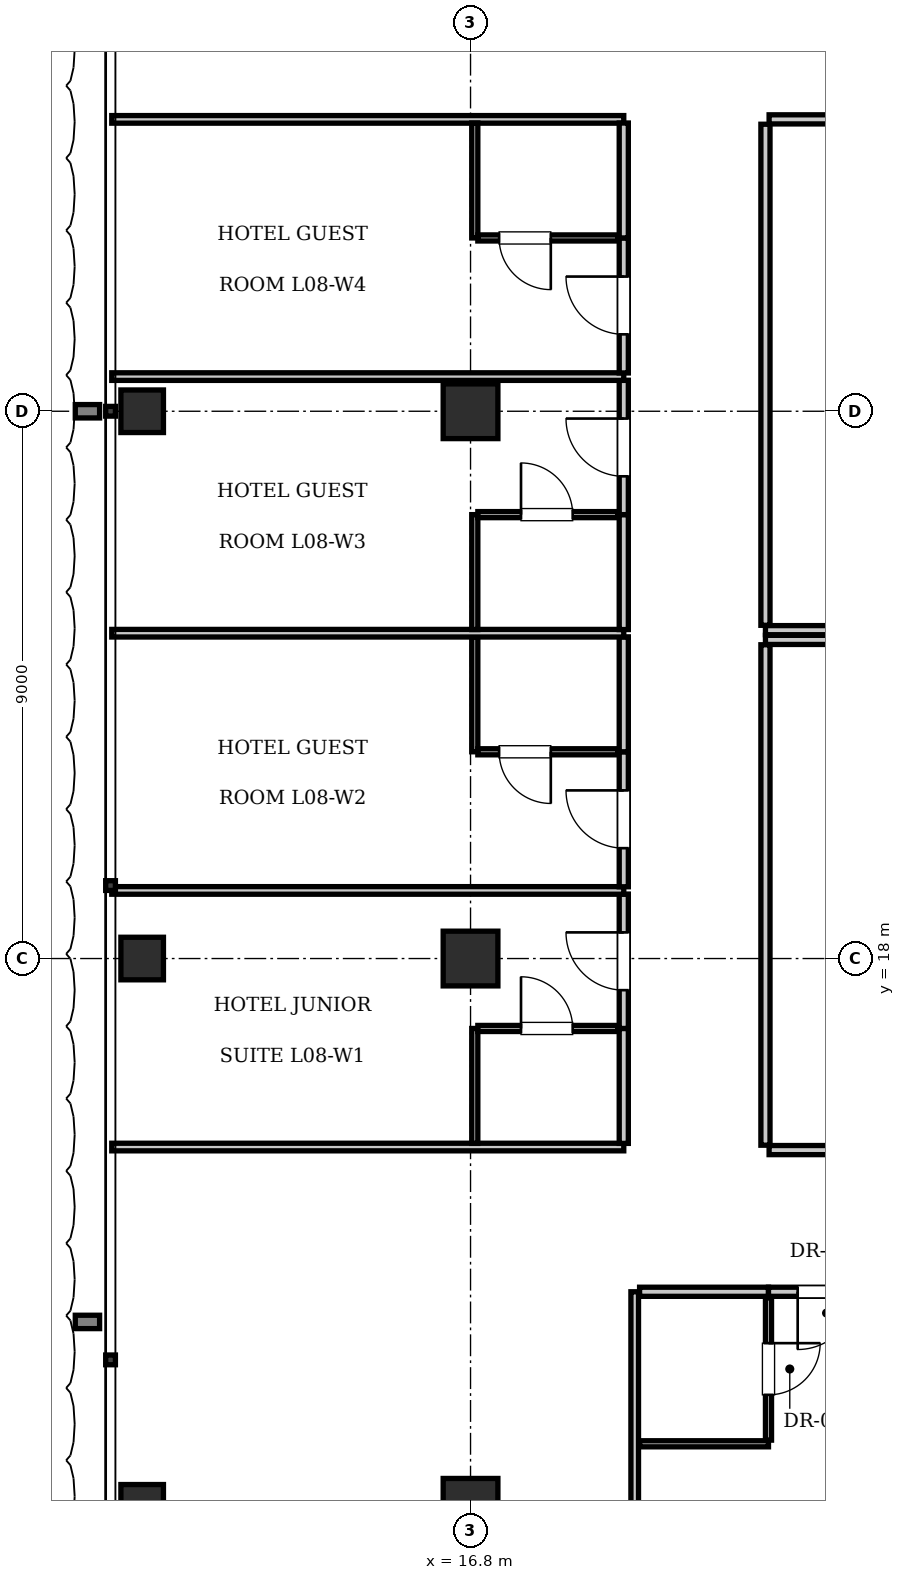
"""IFC4 building model, lengths in metres.
Left out: names, types, materials, properties, quantities, classifications, styles, units other than length and angle.
Written with IfcOpenShell. Run it as: python <this file> out.ifc"""

import sys

from ifc_helpers import new_model, si_unit, direction, frame, frame_2d, origin, origin_2d, place, context, subcontext, project, spatial, rectangle, i_section, extrude, element, fill, save


model = new_model("IFC4")
c1 = context("Model", 3, precision=1e-05, world=origin(), true_north=direction((0.0, 1.0)))
c2 = subcontext(c1, "Body", "Model", "MODEL_VIEW")
j1 = project(units=[si_unit("LENGTHUNIT", "METRE"), si_unit("PLANEANGLEUNIT", "RADIAN")], contexts=[c1])
p1 = place(None, origin())
s1 = spatial("IfcSite", under=j1, at=p1, CompositionType="ELEMENT")
p2 = place(p1, origin())
s2 = spatial("IfcBuilding", under=s1, at=p2, CompositionType="ELEMENT")
p3 = place(p2, frame((0.0, 0.0, 38.5)))
s3 = spatial("IfcBuildingStorey", under=s2, at=p3, CompositionType="ELEMENT", Elevation=38.5)
for number, where, z_axis, x_axis in (
    (1, (16.8, 9.0, 0.0), (0.0, 0.0, 1.0), (1.0, 0.0, 0.0)),
    (2, (16.8, 18.0, 0.0), (0.0, 0.0, 1.0), (1.0, 0.0, 0.0)),
    (3, (16.8, 27.0, 0.0), (0.0, 0.0, 1.0), (1.0, 0.0, 0.0)),
):
    element("IfcColumn", number, at=place(p3, frame(where, z_axis=z_axis, x_axis=x_axis)), inside=s3, PredefinedType="COLUMN", context=c2, shape_type="SweptSolid", body=[
        extrude(rectangle(XDim=0.9, YDim=0.9, at=origin_2d()), origin(), (0.0, 0.0, 1.0), 3.85),
    ])
for number, where, z_axis, x_axis in (
    (4, (11.4, 9.0, 0.0), (0.0, 0.0, 1.0), (1.0, 0.0, 0.0)),
    (5, (11.4, 18.0, 0.0), (0.0, 0.0, 1.0), (1.0, 0.0, 0.0)),
    (6, (11.4, 27.0, 0.0), (0.0, 0.0, 1.0), (1.0, 0.0, 0.0)),
):
    element("IfcColumn", number, at=place(p3, frame(where, z_axis=z_axis, x_axis=x_axis)), inside=s3, PredefinedType="COLUMN", context=c2, shape_type="SweptSolid", body=[
        extrude(i_section(OverallWidth=0.7, OverallDepth=0.7, WebThickness=0.028, FlangeThickness=0.044, at=origin_2d()), origin(), (0.0, 0.0, 1.0), 3.85),
    ])
p4 = place(p3, frame((21.65, 23.4, 0.0), z_axis=(0.0, 0.0, 1.0), x_axis=(1.0, 0.0, 0.0)))
e7 = element("IfcWall", 7, at=p4, inside=s3, PredefinedType="PARTITIONING", context=c2, shape_type="SweptSolid", body=[
    extrude(rectangle(XDim=32.3, YDim=0.15, at=frame_2d((16.15, 0.0))), origin(), (0.0, 0.0, 1.0), 3.61),
])
p5 = place(p3, frame((21.65, 23.48, 0.0), z_axis=(0.0, 0.0, 1.0), x_axis=(0.0, 1.0, 0.0)))
e8 = element("IfcWall", 8, at=p5, inside=s3, PredefinedType="PARTITIONING", context=c2, shape_type="SweptSolid", body=[
    extrude(rectangle(XDim=8.24, YDim=0.15, at=frame_2d((4.12, 0.0))), origin(), (0.0, 0.0, 1.0), 3.61),
])
p6 = place(p3, frame((21.71, 31.8, 0.0), z_axis=(0.0, 0.0, 1.0), x_axis=(1.0, 0.0, 0.0)))
e9 = element("IfcWall", 9, at=p6, inside=s3, PredefinedType="PARTITIONING", context=c2, shape_type="SweptSolid", body=[
    extrude(rectangle(XDim=5.078, YDim=0.15, at=frame_2d((2.539, 0.0))), origin(), (0.0, 0.0, 1.0), 3.61),
])
p7 = place(p6, frame((2.089, 0.0, 0.0)))
e10 = element("IfcOpeningElement", 10, at=p7, cuts=e9, PredefinedType="OPENING", context=c2, shape_type="SweptSolid", body=[
    extrude(rectangle(XDim=0.9, YDim=2.1, at=frame_2d((0.45, 1.05))), frame((0.0, 0.085, 0.0), z_axis=(0.0, -1.0, 0.0), x_axis=(1.0, 0.0, 0.0)), (0.0, 0.0, 1.0), 0.17),
])
p8 = place(p3, frame((21.65, 23.24, 0.0), z_axis=(0.0, 0.0, 1.0), x_axis=(1.0, 0.0, 0.0)))
e11 = element("IfcWall", 11, at=p8, inside=s3, PredefinedType="PARTITIONING", context=c2, shape_type="SweptSolid", body=[
    extrude(rectangle(XDim=32.3, YDim=0.15, at=frame_2d((16.15, 0.0))), origin(), (0.0, 0.0, 1.0), 3.61),
])
p9 = place(p3, frame((21.65, 14.93, 0.0), z_axis=(0.0, 0.0, 1.0), x_axis=(0.0, 1.0, 0.0)))
e12 = element("IfcWall", 12, at=p9, inside=s3, PredefinedType="PARTITIONING", context=c2, shape_type="SweptSolid", body=[
    extrude(rectangle(XDim=8.23, YDim=0.15, at=frame_2d((4.115, 0.0))), origin(), (0.0, 0.0, 1.0), 3.61),
])
p10 = place(p3, frame((21.71, 14.85, 0.0), z_axis=(0.0, 0.0, 1.0), x_axis=(1.0, 0.0, 0.0)))
e13 = element("IfcWall", 13, at=p10, inside=s3, PredefinedType="PARTITIONING", context=c2, shape_type="SweptSolid", body=[
    extrude(rectangle(XDim=11.861, YDim=0.15, at=frame_2d((5.931, 0.0))), origin(), (0.0, 0.0, 1.0), 3.61),
])
p11 = place(p10, frame((5.48, 0.0, 0.0)))
e14 = element("IfcOpeningElement", 14, at=p11, cuts=e13, PredefinedType="OPENING", context=c2, shape_type="SweptSolid", body=[
    extrude(rectangle(XDim=0.9, YDim=2.1, at=frame_2d((0.45, 1.05))), frame((0.0, 0.085, 0.0), z_axis=(0.0, -1.0, 0.0), x_axis=(1.0, 0.0, 0.0)), (0.0, 0.0, 1.0), 0.17),
])
p12 = place(p3, frame((19.5, 0.1, 0.0), z_axis=(0.0, 0.0, 1.0), x_axis=(0.0, 1.0, 0.0)))
e15 = element("IfcWall", 15, at=p12, inside=s3, PredefinedType="PARTITIONING", context=c2, shape_type="SweptSolid", body=[
    extrude(rectangle(XDim=12.42, YDim=0.125, at=frame_2d((6.21, 0.0))), origin(), (0.0, 0.0, 1.0), 3.61),
])
p13 = place(p3, frame((19.58, 12.52, 0.0), z_axis=(0.0, 0.0, 1.0), x_axis=(1.0, 0.0, 0.0)))
e16 = element("IfcWall", 16, at=p13, inside=s3, PredefinedType="PARTITIONING", context=c2, shape_type="SweptSolid", body=[
    extrude(rectangle(XDim=2.12, YDim=0.15, at=frame_2d((1.06, 0.0))), origin(), (0.0, 0.0, 1.0), 3.61),
])
p14 = place(p3, frame((19.58, 10.02, 0.0), z_axis=(0.0, 0.0, 1.0), x_axis=(1.0, 0.0, 0.0)))
e17 = element("IfcWall", 17, at=p14, inside=s3, PredefinedType="PARTITIONING", context=c2, shape_type="SweptSolid", body=[
    extrude(rectangle(XDim=2.12, YDim=0.1, at=frame_2d((1.06, 0.0))), origin(), (0.0, 0.0, 1.0), 3.61),
])
p15 = place(p3, frame((21.7, 10.08, 0.0), z_axis=(0.0, 0.0, 1.0), x_axis=(0.0, 1.0, 0.0)))
e18 = element("IfcWall", 18, at=p15, inside=s3, PredefinedType="PARTITIONING", context=c2, shape_type="SweptSolid", body=[
    extrude(rectangle(XDim=2.34, YDim=0.1, at=frame_2d((1.17, 0.0))), origin(), (0.0, 0.0, 1.0), 3.61),
])
p16 = place(p15, frame((0.745, 0.0, 0.0)))
e19 = element("IfcOpeningElement", 19, at=p16, cuts=e18, PredefinedType="OPENING", context=c2, shape_type="SweptSolid", body=[
    extrude(rectangle(XDim=0.85, YDim=2.1, at=frame_2d((0.425, 1.05))), frame((0.0, 0.06, 0.0), z_axis=(0.0, -1.0, 0.0), x_axis=(1.0, 0.0, 0.0)), (0.0, 0.0, 1.0), 0.12),
])
p17 = place(p3, frame((21.7, 12.52, 0.0), z_axis=(0.0, 0.0, 1.0), x_axis=(1.0, 0.0, 0.0)))
e20 = element("IfcWall", 20, at=p17, inside=s3, PredefinedType="PARTITIONING", context=c2, shape_type="SweptSolid", body=[
    extrude(rectangle(XDim=1.91, YDim=0.15, at=frame_2d((0.955, 0.0))), origin(), (0.0, 0.0, 1.0), 3.61),
])
p18 = place(p17, frame((0.48, 0.0, 0.0)))
e21 = element("IfcOpeningElement", 21, at=p18, cuts=e20, PredefinedType="OPENING", context=c2, shape_type="SweptSolid", body=[
    extrude(rectangle(XDim=0.95, YDim=2.15, at=frame_2d((0.475, 1.075))), frame((0.0, 0.085, 0.0), z_axis=(0.0, -1.0, 0.0), x_axis=(1.0, 0.0, 0.0)), (0.0, 0.0, 1.0), 0.17),
])
for number, where, z_axis, x_axis in (
    (22, (10.9, 14.9, 0.0), (0.0, 0.0, 1.0), (1.0, 0.0, 0.0)),
    (23, (10.9, 31.8, 0.0), (0.0, 0.0, 1.0), (1.0, 0.0, 0.0)),
):
    element("IfcWall", number, at=place(p3, frame(where, z_axis=z_axis, x_axis=x_axis)), inside=s3, PredefinedType="PARTITIONING", context=c2, shape_type="SweptSolid", body=[
        extrude(rectangle(XDim=8.42, YDim=0.125, at=frame_2d((4.21, 0.0))), origin(), (0.0, 0.0, 1.0), 3.61),
    ])
p19 = place(p3, frame((19.32, 14.96, 0.0), z_axis=(0.0, 0.0, 1.0), x_axis=(0.0, 1.0, 0.0)))
e24 = element("IfcWall", 24, at=p19, inside=s3, PredefinedType="PARTITIONING", context=c2, shape_type="SweptSolid", body=[
    extrude(rectangle(XDim=1.89, YDim=0.15, at=frame_2d((0.945, 0.0))), origin(), (0.0, 0.0, 1.0), 3.61),
])
p20 = place(p3, frame((19.32, 16.85, 0.0), z_axis=(0.0, 0.0, 1.0), x_axis=(0.0, 1.0, 0.0)))
e25 = element("IfcWall", 25, at=p20, inside=s3, PredefinedType="PARTITIONING", context=c2, shape_type="SweptSolid", body=[
    extrude(rectangle(XDim=2.21, YDim=0.15, at=frame_2d((1.105, 0.0))), origin(), (0.0, 0.0, 1.0), 3.61),
])
p21 = place(p20, frame((0.63, 0.0, 0.0)))
e26 = element("IfcOpeningElement", 26, at=p21, cuts=e25, PredefinedType="OPENING", context=c2, shape_type="SweptSolid", body=[
    extrude(rectangle(XDim=0.95, YDim=2.15, at=frame_2d((0.475, 1.075))), frame((0.0, 0.085, 0.0), z_axis=(0.0, -1.0, 0.0), x_axis=(1.0, 0.0, 0.0)), (0.0, 0.0, 1.0), 0.17),
])
p22 = place(p3, frame((16.87, 14.96, 0.0), z_axis=(0.0, 0.0, 1.0), x_axis=(0.0, 1.0, 0.0)))
e27 = element("IfcWall", 27, at=p22, inside=s3, PredefinedType="PARTITIONING", context=c2, shape_type="SweptSolid", body=[
    extrude(rectangle(XDim=1.89, YDim=0.1, at=frame_2d((0.945, 0.0))), origin(), (0.0, 0.0, 1.0), 2.988),
])
p23 = place(p3, frame((16.92, 16.85, 0.0), z_axis=(0.0, 0.0, 1.0), x_axis=(1.0, 0.0, 0.0)))
e28 = element("IfcWall", 28, at=p23, inside=s3, PredefinedType="PARTITIONING", context=c2, shape_type="SweptSolid", body=[
    extrude(rectangle(XDim=2.3, YDim=0.1, at=frame_2d((1.15, 0.0))), origin(), (0.0, 0.0, 1.0), 3.61),
])
p24 = place(p23, frame((0.71, 0.0, 0.0)))
e29 = element("IfcOpeningElement", 29, at=p24, cuts=e28, PredefinedType="OPENING", context=c2, shape_type="SweptSolid", body=[
    extrude(rectangle(XDim=0.85, YDim=2.1, at=frame_2d((0.425, 1.05))), frame((0.0, 0.06, 0.0), z_axis=(0.0, -1.0, 0.0), x_axis=(1.0, 0.0, 0.0)), (0.0, 0.0, 1.0), 0.12),
])
p25 = place(p3, frame((10.9, 19.12, 0.0), z_axis=(0.0, 0.0, 1.0), x_axis=(1.0, 0.0, 0.0)))
e30 = element("IfcWall", 30, at=p25, inside=s3, PredefinedType="PARTITIONING", context=c2, shape_type="SweptSolid", body=[
    extrude(rectangle(XDim=8.42, YDim=0.125, at=frame_2d((4.21, 0.0))), origin(), (0.0, 0.0, 1.0), 3.61),
])
p26 = place(p3, frame((19.32, 19.18, 0.0), z_axis=(0.0, 0.0, 1.0), x_axis=(0.0, 1.0, 0.0)))
e31 = element("IfcWall", 31, at=p26, inside=s3, PredefinedType="PARTITIONING", context=c2, shape_type="SweptSolid", body=[
    extrude(rectangle(XDim=2.22, YDim=0.15, at=frame_2d((1.11, 0.0))), origin(), (0.0, 0.0, 1.0), 3.61),
])
p27 = place(p26, frame((0.635, 0.0, 0.0)))
e32 = element("IfcOpeningElement", 32, at=p27, cuts=e31, PredefinedType="OPENING", context=c2, shape_type="SweptSolid", body=[
    extrude(rectangle(XDim=0.95, YDim=2.15, at=frame_2d((0.475, 1.075))), frame((0.0, 0.085, 0.0), z_axis=(0.0, -1.0, 0.0), x_axis=(1.0, 0.0, 0.0)), (0.0, 0.0, 1.0), 0.17),
])
p28 = place(p3, frame((19.32, 21.4, 0.0), z_axis=(0.0, 0.0, 1.0), x_axis=(0.0, 1.0, 0.0)))
e33 = element("IfcWall", 33, at=p28, inside=s3, PredefinedType="PARTITIONING", context=c2, shape_type="SweptSolid", body=[
    extrude(rectangle(XDim=1.89, YDim=0.15, at=frame_2d((0.945, 0.0))), origin(), (0.0, 0.0, 1.0), 3.61),
])
p29 = place(p3, frame((16.87, 21.4, 0.0), z_axis=(0.0, 0.0, 1.0), x_axis=(0.0, 1.0, 0.0)))
e34 = element("IfcWall", 34, at=p29, inside=s3, PredefinedType="PARTITIONING", context=c2, shape_type="SweptSolid", body=[
    extrude(rectangle(XDim=1.89, YDim=0.1, at=frame_2d((0.945, 0.0))), origin(), (0.0, 0.0, 1.0), 2.988),
])
p30 = place(p3, frame((16.92, 21.4, 0.0), z_axis=(0.0, 0.0, 1.0), x_axis=(1.0, 0.0, 0.0)))
e35 = element("IfcWall", 35, at=p30, inside=s3, PredefinedType="PARTITIONING", context=c2, shape_type="SweptSolid", body=[
    extrude(rectangle(XDim=2.3, YDim=0.1, at=frame_2d((1.15, 0.0))), origin(), (0.0, 0.0, 1.0), 3.61),
])
p31 = place(p30, frame((0.35, 0.0, 0.0)))
e36 = element("IfcOpeningElement", 36, at=p31, cuts=e35, PredefinedType="OPENING", context=c2, shape_type="SweptSolid", body=[
    extrude(rectangle(XDim=0.85, YDim=2.1, at=frame_2d((0.425, 1.05))), frame((0.0, 0.06, 0.0), z_axis=(0.0, -1.0, 0.0), x_axis=(1.0, 0.0, 0.0)), (0.0, 0.0, 1.0), 0.12),
])
p32 = place(p3, frame((10.9, 23.35, 0.0), z_axis=(0.0, 0.0, 1.0), x_axis=(1.0, 0.0, 0.0)))
e37 = element("IfcWall", 37, at=p32, inside=s3, PredefinedType="PARTITIONING", context=c2, shape_type="SweptSolid", body=[
    extrude(rectangle(XDim=8.42, YDim=0.125, at=frame_2d((4.21, 0.0))), origin(), (0.0, 0.0, 1.0), 3.61),
])
p33 = place(p3, frame((19.32, 23.41, 0.0), z_axis=(0.0, 0.0, 1.0), x_axis=(0.0, 1.0, 0.0)))
e38 = element("IfcWall", 38, at=p33, inside=s3, PredefinedType="PARTITIONING", context=c2, shape_type="SweptSolid", body=[
    extrude(rectangle(XDim=1.89, YDim=0.15, at=frame_2d((0.945, 0.0))), origin(), (0.0, 0.0, 1.0), 3.61),
])
p34 = place(p3, frame((19.32, 25.3, 0.0), z_axis=(0.0, 0.0, 1.0), x_axis=(0.0, 1.0, 0.0)))
e39 = element("IfcWall", 39, at=p34, inside=s3, PredefinedType="PARTITIONING", context=c2, shape_type="SweptSolid", body=[
    extrude(rectangle(XDim=2.21, YDim=0.15, at=frame_2d((1.105, 0.0))), origin(), (0.0, 0.0, 1.0), 3.61),
])
p35 = place(p34, frame((0.63, 0.0, 0.0)))
e40 = element("IfcOpeningElement", 40, at=p35, cuts=e39, PredefinedType="OPENING", context=c2, shape_type="SweptSolid", body=[
    extrude(rectangle(XDim=0.95, YDim=2.15, at=frame_2d((0.475, 1.075))), frame((0.0, 0.085, 0.0), z_axis=(0.0, -1.0, 0.0), x_axis=(1.0, 0.0, 0.0)), (0.0, 0.0, 1.0), 0.17),
])
p36 = place(p3, frame((16.87, 23.41, 0.0), z_axis=(0.0, 0.0, 1.0), x_axis=(0.0, 1.0, 0.0)))
e41 = element("IfcWall", 41, at=p36, inside=s3, PredefinedType="PARTITIONING", context=c2, shape_type="SweptSolid", body=[
    extrude(rectangle(XDim=1.89, YDim=0.1, at=frame_2d((0.945, 0.0))), origin(), (0.0, 0.0, 1.0), 2.988),
])
p37 = place(p3, frame((16.92, 25.3, 0.0), z_axis=(0.0, 0.0, 1.0), x_axis=(1.0, 0.0, 0.0)))
e42 = element("IfcWall", 42, at=p37, inside=s3, PredefinedType="PARTITIONING", context=c2, shape_type="SweptSolid", body=[
    extrude(rectangle(XDim=2.3, YDim=0.1, at=frame_2d((1.15, 0.0))), origin(), (0.0, 0.0, 1.0), 3.61),
])
p38 = place(p37, frame((0.71, 0.0, 0.0)))
e43 = element("IfcOpeningElement", 43, at=p38, cuts=e42, PredefinedType="OPENING", context=c2, shape_type="SweptSolid", body=[
    extrude(rectangle(XDim=0.85, YDim=2.1, at=frame_2d((0.425, 1.05))), frame((0.0, 0.06, 0.0), z_axis=(0.0, -1.0, 0.0), x_axis=(1.0, 0.0, 0.0)), (0.0, 0.0, 1.0), 0.12),
])
p39 = place(p3, frame((10.9, 27.57, 0.0), z_axis=(0.0, 0.0, 1.0), x_axis=(1.0, 0.0, 0.0)))
e44 = element("IfcWall", 44, at=p39, inside=s3, PredefinedType="PARTITIONING", context=c2, shape_type="SweptSolid", body=[
    extrude(rectangle(XDim=8.42, YDim=0.125, at=frame_2d((4.21, 0.0))), origin(), (0.0, 0.0, 1.0), 3.61),
])
p40 = place(p3, frame((19.32, 27.63, 0.0), z_axis=(0.0, 0.0, 1.0), x_axis=(0.0, 1.0, 0.0)))
e45 = element("IfcWall", 45, at=p40, inside=s3, PredefinedType="PARTITIONING", context=c2, shape_type="SweptSolid", body=[
    extrude(rectangle(XDim=2.22, YDim=0.15, at=frame_2d((1.11, 0.0))), origin(), (0.0, 0.0, 1.0), 3.61),
])
p41 = place(p40, frame((0.635, 0.0, 0.0)))
e46 = element("IfcOpeningElement", 46, at=p41, cuts=e45, PredefinedType="OPENING", context=c2, shape_type="SweptSolid", body=[
    extrude(rectangle(XDim=0.95, YDim=2.15, at=frame_2d((0.475, 1.075))), frame((0.0, 0.085, 0.0), z_axis=(0.0, -1.0, 0.0), x_axis=(1.0, 0.0, 0.0)), (0.0, 0.0, 1.0), 0.17),
])
p42 = place(p3, frame((19.32, 29.85, 0.0), z_axis=(0.0, 0.0, 1.0), x_axis=(0.0, 1.0, 0.0)))
e47 = element("IfcWall", 47, at=p42, inside=s3, PredefinedType="PARTITIONING", context=c2, shape_type="SweptSolid", body=[
    extrude(rectangle(XDim=1.89, YDim=0.15, at=frame_2d((0.945, 0.0))), origin(), (0.0, 0.0, 1.0), 3.61),
])
p43 = place(p3, frame((16.87, 29.85, 0.0), z_axis=(0.0, 0.0, 1.0), x_axis=(0.0, 1.0, 0.0)))
e48 = element("IfcWall", 48, at=p43, inside=s3, PredefinedType="PARTITIONING", context=c2, shape_type="SweptSolid", body=[
    extrude(rectangle(XDim=1.89, YDim=0.1, at=frame_2d((0.945, 0.0))), origin(), (0.0, 0.0, 1.0), 2.988),
])
p44 = place(p3, frame((16.92, 29.85, 0.0), z_axis=(0.0, 0.0, 1.0), x_axis=(1.0, 0.0, 0.0)))
e49 = element("IfcWall", 49, at=p44, inside=s3, PredefinedType="PARTITIONING", context=c2, shape_type="SweptSolid", body=[
    extrude(rectangle(XDim=2.3, YDim=0.1, at=frame_2d((1.15, 0.0))), origin(), (0.0, 0.0, 1.0), 3.61),
])
p45 = place(p44, frame((0.35, 0.0, 0.0)))
e50 = element("IfcOpeningElement", 50, at=p45, cuts=e49, PredefinedType="OPENING", context=c2, shape_type="SweptSolid", body=[
    extrude(rectangle(XDim=0.85, YDim=2.1, at=frame_2d((0.425, 1.05))), frame((0.0, 0.06, 0.0), z_axis=(0.0, -1.0, 0.0), x_axis=(1.0, 0.0, 0.0)), (0.0, 0.0, 1.0), 0.12),
])
p46 = place(p16, frame((0.85, 0.0, 0.0), z_axis=(0.0, 0.0, 1.0), x_axis=(-1.0, 0.0, 0.0)))
e51 = element("IfcDoor", 51, at=p46, inside=s3, OperationType="SINGLE_SWING_LEFT", PredefinedType="DOOR", context=c2, shape_type="SweptSolid", body=[
    extrude(rectangle(XDim=0.85, YDim=2.1, at=frame_2d((0.425, 1.05))), frame((0.0, 0.025, 0.0), z_axis=(0.0, -1.0, 0.0), x_axis=(1.0, 0.0, 0.0)), (0.0, 0.0, 1.0), 0.05),
])
fill(e19, e51)
p47 = place(p18, frame((0.95, 0.0, 0.0), z_axis=(0.0, 0.0, 1.0), x_axis=(-1.0, 0.0, 0.0)))
e52 = element("IfcDoor", 52, at=p47, inside=s3, OperationType="SINGLE_SWING_RIGHT", PredefinedType="DOOR", context=c2, shape_type="SweptSolid", body=[
    extrude(rectangle(XDim=0.95, YDim=2.15, at=frame_2d((0.475, 1.075))), frame((0.0, 0.025, 0.0), z_axis=(0.0, -1.0, 0.0), x_axis=(1.0, 0.0, 0.0)), (0.0, 0.0, 1.0), 0.05),
])
fill(e21, e52)
p48 = place(p24, origin())
e53 = element("IfcDoor", 53, at=p48, inside=s3, OperationType="SINGLE_SWING_LEFT", PredefinedType="DOOR", context=c2, shape_type="SweptSolid", body=[
    extrude(rectangle(XDim=0.85, YDim=2.1, at=frame_2d((0.425, 1.05))), frame((0.0, 0.025, 0.0), z_axis=(0.0, -1.0, 0.0), x_axis=(1.0, 0.0, 0.0)), (0.0, 0.0, 1.0), 0.05),
])
fill(e29, e53)
p49 = place(p21, origin())
e54 = element("IfcDoor", 54, at=p49, inside=s3, OperationType="SINGLE_SWING_RIGHT", PredefinedType="DOOR", context=c2, shape_type="SweptSolid", body=[
    extrude(rectangle(XDim=0.95, YDim=2.15, at=frame_2d((0.475, 1.075))), frame((0.0, 0.025, 0.0), z_axis=(0.0, -1.0, 0.0), x_axis=(1.0, 0.0, 0.0)), (0.0, 0.0, 1.0), 0.05),
])
fill(e26, e54)
p50 = place(p31, frame((0.85, 0.0, 0.0), z_axis=(0.0, 0.0, 1.0), x_axis=(-1.0, 0.0, 0.0)))
e55 = element("IfcDoor", 55, at=p50, inside=s3, OperationType="SINGLE_SWING_LEFT", PredefinedType="DOOR", context=c2, shape_type="SweptSolid", body=[
    extrude(rectangle(XDim=0.85, YDim=2.1, at=frame_2d((0.425, 1.05))), frame((0.0, 0.025, 0.0), z_axis=(0.0, -1.0, 0.0), x_axis=(1.0, 0.0, 0.0)), (0.0, 0.0, 1.0), 0.05),
])
fill(e36, e55)
p51 = place(p27, origin())
e56 = element("IfcDoor", 56, at=p51, inside=s3, OperationType="SINGLE_SWING_RIGHT", PredefinedType="DOOR", context=c2, shape_type="SweptSolid", body=[
    extrude(rectangle(XDim=0.95, YDim=2.15, at=frame_2d((0.475, 1.075))), frame((0.0, 0.025, 0.0), z_axis=(0.0, -1.0, 0.0), x_axis=(1.0, 0.0, 0.0)), (0.0, 0.0, 1.0), 0.05),
])
fill(e32, e56)
p52 = place(p38, origin())
e57 = element("IfcDoor", 57, at=p52, inside=s3, OperationType="SINGLE_SWING_LEFT", PredefinedType="DOOR", context=c2, shape_type="SweptSolid", body=[
    extrude(rectangle(XDim=0.85, YDim=2.1, at=frame_2d((0.425, 1.05))), frame((0.0, 0.025, 0.0), z_axis=(0.0, -1.0, 0.0), x_axis=(1.0, 0.0, 0.0)), (0.0, 0.0, 1.0), 0.05),
])
fill(e43, e57)
p53 = place(p35, origin())
e58 = element("IfcDoor", 58, at=p53, inside=s3, OperationType="SINGLE_SWING_RIGHT", PredefinedType="DOOR", context=c2, shape_type="SweptSolid", body=[
    extrude(rectangle(XDim=0.95, YDim=2.15, at=frame_2d((0.475, 1.075))), frame((0.0, 0.025, 0.0), z_axis=(0.0, -1.0, 0.0), x_axis=(1.0, 0.0, 0.0)), (0.0, 0.0, 1.0), 0.05),
])
fill(e40, e58)
p54 = place(p45, frame((0.85, 0.0, 0.0), z_axis=(0.0, 0.0, 1.0), x_axis=(-1.0, 0.0, 0.0)))
e59 = element("IfcDoor", 59, at=p54, inside=s3, OperationType="SINGLE_SWING_LEFT", PredefinedType="DOOR", context=c2, shape_type="SweptSolid", body=[
    extrude(rectangle(XDim=0.85, YDim=2.1, at=frame_2d((0.425, 1.05))), frame((0.0, 0.025, 0.0), z_axis=(0.0, -1.0, 0.0), x_axis=(1.0, 0.0, 0.0)), (0.0, 0.0, 1.0), 0.05),
])
fill(e50, e59)
p55 = place(p41, origin())
e60 = element("IfcDoor", 60, at=p55, inside=s3, OperationType="SINGLE_SWING_RIGHT", PredefinedType="DOOR", context=c2, shape_type="SweptSolid", body=[
    extrude(rectangle(XDim=0.95, YDim=2.15, at=frame_2d((0.475, 1.075))), frame((0.0, 0.025, 0.0), z_axis=(0.0, -1.0, 0.0), x_axis=(1.0, 0.0, 0.0)), (0.0, 0.0, 1.0), 0.05),
])
fill(e46, e60)
save(model, sys.argv[1])
